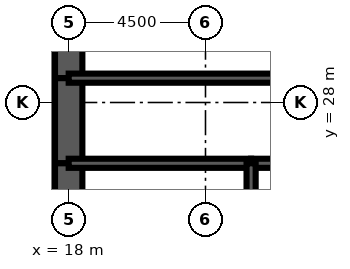
"""IFC4 building model, lengths in metres.
Left out: names, types, materials, properties, quantities, classifications, styles, units other than length and angle.
Written with IfcOpenShell. Run it as: python <this file> out.ifc"""

import sys

from ifc_helpers import new_model, si_unit, direction, frame, frame_2d, origin, place, context, subcontext, project, spatial, rectangle, extrude, element, fill, save


model = new_model("IFC4")
c1 = context("Model", 3, precision=1e-05, world=origin(), true_north=direction((0.0, 1.0)))
c2 = subcontext(c1, "Body", "Model", "MODEL_VIEW")
j1 = project(units=[si_unit("LENGTHUNIT", "METRE"), si_unit("PLANEANGLEUNIT", "RADIAN")], contexts=[c1])
p1 = place(None, origin())
s1 = spatial("IfcSite", under=j1, at=p1, CompositionType="ELEMENT")
p2 = place(p1, origin())
s2 = spatial("IfcBuilding", under=s1, at=p2, CompositionType="ELEMENT")
p3 = place(p2, frame((0.0, 0.0, 27.5)))
s3 = spatial("IfcBuildingStorey", under=s2, at=p3, CompositionType="ELEMENT", Elevation=27.5)
p4 = place(p3, frame((18.0, 32.0, 0.0), z_axis=(0.0, 0.0, 1.0), x_axis=(0.0, -1.0, 0.0)))
e1 = element("IfcWall", 1, at=p4, inside=s3, PredefinedType="SHEAR", context=c2, shape_type="SweptSolid", body=[
    extrude(rectangle(XDim=3.2, YDim=0.9, at=frame_2d((1.6, 0.0))), origin(), (0.0, 0.0, 1.0), 4.5),
])
p5 = place(p3, frame((18.0, 28.8, 0.0), z_axis=(0.0, 0.0, 1.0), x_axis=(0.0, -1.0, 0.0)))
e2 = element("IfcWall", 2, at=p5, inside=s3, PredefinedType="SHEAR", context=c2, shape_type="SweptSolid", body=[
    extrude(rectangle(XDim=2.8, YDim=0.9, at=frame_2d((1.4, 0.0))), origin(), (0.0, 0.0, 1.0), 4.5),
])
p6 = place(p5, frame((0.4, 0.0, 0.0)))
e3 = element("IfcOpeningElement", 3, at=p6, cuts=e2, PredefinedType="OPENING", context=c2, shape_type="SweptSolid", body=[
    extrude(rectangle(XDim=1.8, YDim=2.1, at=frame_2d((0.9, 1.05))), frame((0.0, 0.46, 0.0), z_axis=(0.0, -1.0, 0.0), x_axis=(1.0, 0.0, 0.0)), (0.0, 0.0, 1.0), 0.92),
])
p7 = place(p3, frame((18.0, 26.0, 0.0), z_axis=(0.0, 0.0, 1.0), x_axis=(0.0, -1.0, 0.0)))
e4 = element("IfcWall", 4, at=p7, inside=s3, PredefinedType="SHEAR", context=c2, shape_type="SweptSolid", body=[
    extrude(rectangle(XDim=4.0, YDim=0.9, at=frame_2d((2.0, 0.0))), origin(), (0.0, 0.0, 1.0), 4.5),
])
p8 = place(p3, frame((18.0, 28.8, 0.0), z_axis=(0.0, 0.0, 1.0), x_axis=(1.0, 0.0, 0.0)))
e5 = element("IfcWall", 5, at=p8, inside=s3, PredefinedType="SOLIDWALL", context=c2, shape_type="SweptSolid", body=[
    extrude(rectangle(XDim=9.0, YDim=0.3, at=frame_2d((4.5, 0.0))), origin(), (0.0, 0.0, 1.0), 4.5),
])
p9 = place(p8, frame((0.65, 0.0, 0.0)))
e6 = element("IfcOpeningElement", 6, at=p9, cuts=e5, PredefinedType="OPENING", context=c2, shape_type="SweptSolid", body=[
    extrude(rectangle(XDim=1.0, YDim=2.1, at=frame_2d((0.5, 1.05))), frame((0.0, 0.16, 0.0), z_axis=(0.0, -1.0, 0.0), x_axis=(1.0, 0.0, 0.0)), (0.0, 0.0, 1.0), 0.32),
])
p10 = place(p3, frame((18.0, 26.0, 0.0), z_axis=(0.0, 0.0, 1.0), x_axis=(1.0, 0.0, 0.0)))
e7 = element("IfcWall", 7, at=p10, inside=s3, PredefinedType="SOLIDWALL", context=c2, shape_type="SweptSolid", body=[
    extrude(rectangle(XDim=6.0, YDim=0.3, at=frame_2d((3.0, 0.0))), origin(), (0.0, 0.0, 1.0), 4.5),
])
p11 = place(p3, frame((24.0, 26.0, 0.0), z_axis=(0.0, 0.0, 1.0), x_axis=(1.0, 0.0, 0.0)))
e8 = element("IfcWall", 8, at=p11, inside=s3, PredefinedType="SOLIDWALL", context=c2, shape_type="SweptSolid", body=[
    extrude(rectangle(XDim=3.0, YDim=0.3, at=frame_2d((1.5, 0.0))), origin(), (0.0, 0.0, 1.0), 4.5),
])
p12 = place(p3, frame((24.0, 22.0, 0.0), z_axis=(0.0, 0.0, 1.0), x_axis=(0.0, 1.0, 0.0)))
e9 = element("IfcWall", 9, at=p12, inside=s3, PredefinedType="SOLIDWALL", context=c2, shape_type="SweptSolid", body=[
    extrude(rectangle(XDim=4.0, YDim=0.3, at=frame_2d((2.0, 0.0))), origin(), (0.0, 0.0, 1.0), 4.5),
])
p13 = place(p3, frame((20.325, 22.15, 0.0), z_axis=(0.0, 0.0, 1.0), x_axis=(0.0, 1.0, 0.0)))
e10 = element("IfcWall", 10, at=p13, inside=s3, PredefinedType="PARTITIONING", context=c2, shape_type="SweptSolid", body=[
    extrude(rectangle(XDim=3.7, YDim=0.15, at=frame_2d((1.85, 0.0))), origin(), (0.0, 0.0, 1.0), 3.0),
])
p14 = place(p3, frame((23.7, 26.15, 0.0), z_axis=(0.0, 0.0, 1.0), x_axis=(0.0, 1.0, 0.0)))
e11 = element("IfcWall", 11, at=p14, inside=s3, PredefinedType="PARTITIONING", context=c2, shape_type="SweptSolid", body=[
    extrude(rectangle(XDim=2.5, YDim=0.15, at=frame_2d((1.25, 0.0))), origin(), (0.0, 0.0, 1.0), 3.0),
])
p15 = place(p14, frame((0.35, 0.0, 0.0)))
e12 = element("IfcOpeningElement", 12, at=p15, cuts=e11, PredefinedType="OPENING", context=c2, shape_type="SweptSolid", body=[
    extrude(rectangle(XDim=1.0, YDim=2.1, at=frame_2d((0.5, 1.05))), frame((0.0, 0.085, 0.0), z_axis=(0.0, -1.0, 0.0), x_axis=(1.0, 0.0, 0.0)), (0.0, 0.0, 1.0), 0.17),
])
p16 = place(p15, origin())
e13 = element("IfcDoor", 13, at=p16, inside=s3, OperationType="SINGLE_SWING_LEFT", PredefinedType="DOOR", context=c2, shape_type="SweptSolid", body=[
    extrude(rectangle(XDim=1.0, YDim=2.1, at=frame_2d((0.5, 1.05))), frame((0.0, 0.025, 0.0), z_axis=(0.0, -1.0, 0.0), x_axis=(1.0, 0.0, 0.0)), (0.0, 0.0, 1.0), 0.05),
])
fill(e12, e13)
p17 = place(p9, origin())
e14 = element("IfcDoor", 14, at=p17, inside=s3, OperationType="SINGLE_SWING_LEFT", PredefinedType="DOOR", context=c2, shape_type="SweptSolid", body=[
    extrude(rectangle(XDim=1.0, YDim=2.1, at=frame_2d((0.5, 1.05))), frame((0.0, 0.025, 0.0), z_axis=(0.0, -1.0, 0.0), x_axis=(1.0, 0.0, 0.0)), (0.0, 0.0, 1.0), 0.05),
])
fill(e6, e14)
p18 = place(p6, origin())
e15 = element("IfcDoor", 15, at=p18, inside=s3, OperationType="SINGLE_SWING_LEFT", PredefinedType="DOOR", context=c2, shape_type="SweptSolid", body=[
    extrude(rectangle(XDim=1.8, YDim=2.1, at=frame_2d((0.9, 1.05))), frame((0.0, 0.45, 0.0), z_axis=(0.0, -1.0, 0.0), x_axis=(1.0, 0.0, 0.0)), (0.0, 0.0, 1.0), 0.899),
])
fill(e3, e15)
save(model, sys.argv[1])
